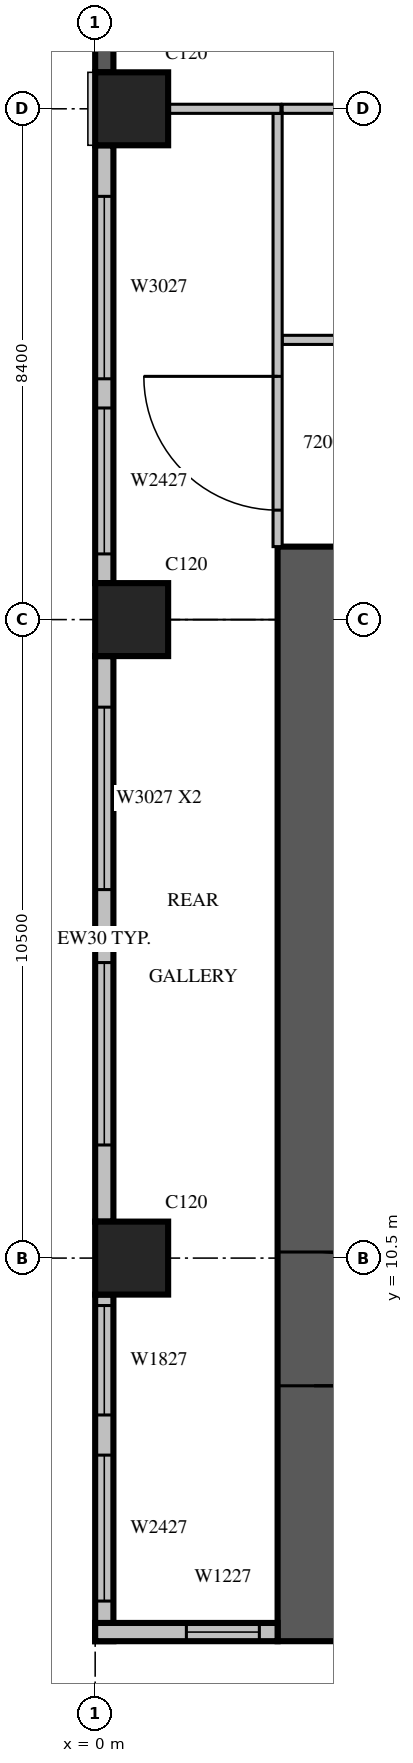
"""IFC4 building model, lengths in metres.
Left out: names, types, materials, properties, quantities, classifications, styles, units other than length and angle.
Written with IfcOpenShell. Run it as: python <this file> out.ifc"""

import sys

from ifc_helpers import new_model, si_unit, direction, frame, frame_2d, origin, origin_2d, place, context, subcontext, project, spatial, rectangle, extrude, source, transform, mapped, element, fill, save


model = new_model("IFC4")
c1 = context("Model", 3, precision=1e-05, world=origin(), true_north=direction((0.0, 1.0)))
c2 = subcontext(c1, "Body", "Model", "MODEL_VIEW")
j1 = project(units=[si_unit("LENGTHUNIT", "METRE"), si_unit("PLANEANGLEUNIT", "RADIAN")], contexts=[c1])
p1 = place(None, origin())
s1 = spatial("IfcSite", under=j1, at=p1, CompositionType="ELEMENT")
p2 = place(p1, origin())
s2 = spatial("IfcBuilding", under=s1, at=p2, CompositionType="ELEMENT")
p3 = place(p2, frame((0.0, 0.0, 95.1)))
s3 = spatial("IfcBuildingStorey", under=s2, at=p3, CompositionType="ELEMENT", Elevation=95.1)
m1 = source(origin(), c2, "Body", "SweptSolid", [
    extrude(rectangle(XDim=1.2, YDim=1.2, at=origin_2d()), origin(), (0.0, 0.0, 1.0), 4.2),
])
for number, where, z_axis, x_axis in (
    (1, (0.6, 10.5, 0.0), (0.0, 0.0, 1.0), (1.0, 0.0, 0.0)),
    (2, (0.6, 21.0, 0.0), (0.0, 0.0, 1.0), (1.0, 0.0, 0.0)),
    (3, (0.6, 29.4, 0.0), (0.0, 0.0, 1.0), (1.0, 0.0, 0.0)),
):
    element("IfcColumn", number, at=place(p3, frame(where, z_axis=z_axis, x_axis=x_axis)), inside=s3, PredefinedType="COLUMN", context=c2, shape_type="MappedRepresentation", body=[
        mapped(m1, transform((0.0, 0.0, 0.0), scale=1.0)),
    ])
m2 = source(origin(), c2, "Body", "SweptSolid", [
    extrude(rectangle(XDim=18.0, YDim=1.2, at=frame_2d((9.0, 0.0))), origin(), (0.0, 0.0, 1.0), 4.2),
])
p4 = place(p3, frame((3.6, 4.2, 0.0), z_axis=(0.0, 0.0, 1.0), x_axis=(0.0, 1.0, 0.0)))
e4 = element("IfcWall", 4, at=p4, inside=s3, PredefinedType="SHEAR", context=c2, shape_type="MappedRepresentation", body=[
    mapped(m2, transform((0.0, 0.0, 0.0), scale=1.0)),
])
m3 = source(origin(), c2, "Body", "SweptSolid", [
    extrude(rectangle(XDim=2.2, YDim=2.1, at=frame_2d((1.1, 1.05))), frame((0.0, 0.61, 0.0), z_axis=(0.0, -1.0, 0.0), x_axis=(1.0, 0.0, 0.0)), (0.0, 0.0, 1.0), 1.22),
])
p5 = place(p4, frame((4.2, 0.0, 0.0)))
e5 = element("IfcOpeningElement", 5, at=p5, cuts=e4, PredefinedType="OPENING", context=c2, shape_type="MappedRepresentation", body=[
    mapped(m3, transform((0.0, 0.0, 0.0), scale=1.0)),
])
m4 = source(origin(), c2, "Body", "SweptSolid", [
    extrude(rectangle(XDim=4.2, YDim=0.3, at=frame_2d((2.1, 0.0))), origin(), (0.0, 0.0, 1.0), 3.8),
])
p6 = place(p3, frame((0.15, 34.2, 0.0), z_axis=(0.0, 0.0, 1.0), x_axis=(0.0, -1.0, 0.0)))
e6 = element("IfcWall", 6, at=p6, inside=s3, PredefinedType="SOLIDWALL", context=c2, shape_type="MappedRepresentation", body=[
    mapped(m4, transform((0.0, 0.0, 0.0), scale=1.0)),
])
m5 = source(origin(), c2, "Body", "SweptSolid", [
    extrude(rectangle(XDim=1.8, YDim=2.7, at=frame_2d((0.9, 1.35))), frame((0.0, 0.16, 0.0), z_axis=(0.0, -1.0, 0.0), x_axis=(1.0, 0.0, 0.0)), (0.0, 0.0, 1.0), 0.32),
])
p7 = place(p6, frame((1.175, 0.0, 0.6)))
e7 = element("IfcOpeningElement", 7, at=p7, cuts=e6, PredefinedType="OPENING", context=c2, shape_type="MappedRepresentation", body=[
    mapped(m5, transform((0.0, 0.0, 0.0), scale=1.0)),
])
m6 = source(origin(), c2, "Body", "SweptSolid", [
    extrude(rectangle(XDim=7.2, YDim=0.3, at=frame_2d((3.6, 0.0))), origin(), (0.0, 0.0, 1.0), 3.8),
])
p8 = place(p3, frame((0.15, 28.8, 0.0), z_axis=(0.0, 0.0, 1.0), x_axis=(0.0, -1.0, 0.0)))
e8 = element("IfcWall", 8, at=p8, inside=s3, PredefinedType="STANDARD", context=c2, shape_type="MappedRepresentation", body=[
    mapped(m6, transform((0.0, 0.0, 0.0), scale=1.0)),
])
m7 = source(origin(), c2, "Body", "SweptSolid", [
    extrude(rectangle(XDim=3.0, YDim=2.7, at=frame_2d((1.5, 1.35))), frame((0.0, 0.16, 0.0), z_axis=(0.0, -1.0, 0.0), x_axis=(1.0, 0.0, 0.0)), (0.0, 0.0, 1.0), 0.32),
])
p9 = place(p8, frame((0.84, 0.0, 0.6)))
e9 = element("IfcOpeningElement", 9, at=p9, cuts=e8, PredefinedType="OPENING", context=c2, shape_type="MappedRepresentation", body=[
    mapped(m7, transform((0.0, 0.0, 0.0), scale=1.0)),
])
m8 = source(origin(), c2, "Body", "SweptSolid", [
    extrude(rectangle(XDim=2.4, YDim=2.7, at=frame_2d((1.2, 1.35))), frame((0.0, 0.16, 0.0), z_axis=(0.0, -1.0, 0.0), x_axis=(1.0, 0.0, 0.0)), (0.0, 0.0, 1.0), 0.32),
])
p10 = place(p8, frame((4.32, 0.0, 0.6)))
e10 = element("IfcOpeningElement", 10, at=p10, cuts=e8, PredefinedType="OPENING", context=c2, shape_type="MappedRepresentation", body=[
    mapped(m8, transform((0.0, 0.0, 0.0), scale=1.0)),
])
m9 = source(origin(), c2, "Body", "SweptSolid", [
    extrude(rectangle(XDim=9.3, YDim=0.3, at=frame_2d((4.65, 0.0))), origin(), (0.0, 0.0, 1.0), 3.8),
])
p11 = place(p3, frame((0.15, 20.4, 0.0), z_axis=(0.0, 0.0, 1.0), x_axis=(0.0, -1.0, 0.0)))
e11 = element("IfcWall", 11, at=p11, inside=s3, PredefinedType="STANDARD", context=c2, shape_type="MappedRepresentation", body=[
    mapped(m9, transform((0.0, 0.0, 0.0), scale=1.0)),
])
p12 = place(p11, frame((0.84, 0.0, 0.6)))
e12 = element("IfcOpeningElement", 12, at=p12, cuts=e11, PredefinedType="OPENING", context=c2, shape_type="MappedRepresentation", body=[
    mapped(m7, transform((0.0, 0.0, 0.0), scale=1.0)),
])
p13 = place(p11, frame((5.04, 0.0, 0.6)))
e13 = element("IfcOpeningElement", 13, at=p13, cuts=e11, PredefinedType="OPENING", context=c2, shape_type="MappedRepresentation", body=[
    mapped(m7, transform((0.0, 0.0, 0.0), scale=1.0)),
])
m10 = source(origin(), c2, "Body", "SweptSolid", [
    extrude(rectangle(XDim=5.7, YDim=0.3, at=frame_2d((2.85, 0.0))), origin(), (0.0, 0.0, 1.0), 3.8),
])
p14 = place(p3, frame((0.15, 9.9, 0.0), z_axis=(0.0, 0.0, 1.0), x_axis=(0.0, -1.0, 0.0)))
e14 = element("IfcWall", 14, at=p14, inside=s3, PredefinedType="STANDARD", context=c2, shape_type="MappedRepresentation", body=[
    mapped(m10, transform((0.0, 0.0, 0.0), scale=1.0)),
])
p15 = place(p14, frame((0.18, 0.0, 0.6)))
e15 = element("IfcOpeningElement", 15, at=p15, cuts=e14, PredefinedType="OPENING", context=c2, shape_type="MappedRepresentation", body=[
    mapped(m5, transform((0.0, 0.0, 0.0), scale=1.0)),
])
p16 = place(p14, frame((2.64, 0.0, 0.6)))
e16 = element("IfcOpeningElement", 16, at=p16, cuts=e14, PredefinedType="OPENING", context=c2, shape_type="MappedRepresentation", body=[
    mapped(m8, transform((0.0, 0.0, 0.0), scale=1.0)),
])
m11 = source(origin(), c2, "Body", "SweptSolid", [
    extrude(rectangle(XDim=3.0, YDim=0.3, at=frame_2d((1.5, 0.0))), origin(), (0.0, 0.0, 1.0), 3.8),
])
p17 = place(p3, frame((0.0, 4.35, 0.0), z_axis=(0.0, 0.0, 1.0), x_axis=(1.0, 0.0, 0.0)))
e17 = element("IfcWall", 17, at=p17, inside=s3, PredefinedType="STANDARD", context=c2, shape_type="MappedRepresentation", body=[
    mapped(m11, transform((0.0, 0.0, 0.0), scale=1.0)),
])
m12 = source(origin(), c2, "Body", "SweptSolid", [
    extrude(rectangle(XDim=1.2, YDim=2.7, at=frame_2d((0.6, 1.35))), frame((0.0, 0.16, 0.0), z_axis=(0.0, -1.0, 0.0), x_axis=(1.0, 0.0, 0.0)), (0.0, 0.0, 1.0), 0.32),
])
p18 = place(p17, frame((1.5, 0.0, 0.6)))
e18 = element("IfcOpeningElement", 18, at=p18, cuts=e17, PredefinedType="OPENING", context=c2, shape_type="MappedRepresentation", body=[
    mapped(m12, transform((0.0, 0.0, 0.0), scale=1.0)),
])
m13 = source(origin(), c2, "Body", "SweptSolid", [
    extrude(rectangle(XDim=11.925, YDim=0.15, at=frame_2d((5.963, 0.0))), origin(), (0.0, 0.0, 1.0), 3.8),
])
p19 = place(p3, frame((3.075, 25.6, 0.0), z_axis=(0.0, 0.0, 1.0), x_axis=(1.0, 0.0, 0.0)))
e19 = element("IfcWall", 19, at=p19, inside=s3, PredefinedType="PARTITIONING", context=c2, shape_type="MappedRepresentation", body=[
    mapped(m13, transform((0.0, 0.0, 0.0), scale=1.0)),
])
m14 = source(origin(), c2, "Body", "SweptSolid", [
    extrude(rectangle(XDim=0.9, YDim=2.1, at=frame_2d((0.45, 1.05))), frame((0.0, 0.085, 0.0), z_axis=(0.0, -1.0, 0.0), x_axis=(1.0, 0.0, 0.0)), (0.0, 0.0, 1.0), 0.17),
])
p20 = place(p19, frame((1.462, 0.0, 0.0)))
e20 = element("IfcOpeningElement", 20, at=p20, cuts=e19, PredefinedType="OPENING", context=c2, shape_type="MappedRepresentation", body=[
    mapped(m14, transform((0.0, 0.0, 0.0), scale=1.0)),
])
p21 = place(p19, frame((8.3, 0.0, 0.0)))
e21 = element("IfcOpeningElement", 21, at=p21, cuts=e19, PredefinedType="OPENING", context=c2, shape_type="MappedRepresentation", body=[
    mapped(m14, transform((0.0, 0.0, 0.0), scale=1.0)),
])
m15 = source(origin(), c2, "Body", "SweptSolid", [
    extrude(rectangle(XDim=6.826, YDim=0.15, at=frame_2d((3.413, 0.0))), origin(), (0.0, 0.0, 1.0), 3.8),
])
p22 = place(p3, frame((9.901, 29.4, 0.0), z_axis=(0.0, 0.0, 1.0), x_axis=(-1.0, 0.0, 0.0)))
e22 = element("IfcWall", 22, at=p22, inside=s3, PredefinedType="PARTITIONING", context=c2, shape_type="MappedRepresentation", body=[
    mapped(m15, transform((0.0, 0.0, 0.0), scale=1.0)),
])
m16 = source(origin(), c2, "Body", "SweptSolid", [
    extrude(rectangle(XDim=7.125, YDim=0.15, at=frame_2d((3.562, 0.0))), origin(), (0.0, 0.0, 1.0), 3.8),
])
p23 = place(p3, frame((3.0, 29.325, 0.0), z_axis=(0.0, 0.0, 1.0), x_axis=(0.0, -1.0, 0.0)))
e23 = element("IfcWall", 23, at=p23, inside=s3, PredefinedType="PARTITIONING", context=c2, shape_type="MappedRepresentation", body=[
    mapped(m16, transform((0.0, 0.0, 0.0), scale=1.0)),
])
m17 = source(origin(), c2, "Body", "SweptSolid", [
    extrude(rectangle(XDim=2.2, YDim=2.1, at=frame_2d((1.1, 1.05))), frame((0.0, 0.085, 0.0), z_axis=(0.0, -1.0, 0.0), x_axis=(1.0, 0.0, 0.0)), (0.0, 0.0, 1.0), 0.17),
])
p24 = place(p23, frame((4.325, 0.0, 0.0)))
e24 = element("IfcOpeningElement", 24, at=p24, cuts=e23, PredefinedType="OPENING", context=c2, shape_type="MappedRepresentation", body=[
    mapped(m17, transform((0.0, 0.0, 0.0), scale=1.0)),
])
m18 = source(origin(), c2, "Body", "SweptSolid", [
    extrude(rectangle(XDim=1.856, YDim=0.15, at=frame_2d((0.928, 0.0))), origin(), (0.0, 0.0, 1.0), 3.8),
])
p25 = place(p3, frame((3.055, 29.4, 0.0), z_axis=(0.0, 0.0, 1.0), x_axis=(-1.0, 0.0, 0.0)))
e25 = element("IfcWall", 25, at=p25, inside=s3, PredefinedType="PARTITIONING", context=c2, shape_type="MappedRepresentation", body=[
    mapped(m18, transform((0.0, 0.0, 0.0), scale=1.0)),
])
m19 = source(origin(), c2, "Body", "SweptSolid", [
    extrude(rectangle(XDim=3.0, YDim=2.7, at=frame_2d((1.5, 1.35))), frame((0.0, 0.03, 0.0), z_axis=(0.0, -1.0, 0.0), x_axis=(1.0, 0.0, 0.0)), (0.0, 0.0, 1.0), 0.06),
])
p26 = place(p9, origin())
e26 = element("IfcWindow", 26, at=p26, inside=s3, PartitioningType="SINGLE_PANEL", PredefinedType="WINDOW", context=c2, shape_type="MappedRepresentation", body=[
    mapped(m19, transform((0.0, 0.0, 0.0), scale=1.0)),
])
fill(e9, e26)
p27 = place(p12, origin())
e27 = element("IfcWindow", 27, at=p27, inside=s3, PartitioningType="SINGLE_PANEL", PredefinedType="WINDOW", context=c2, shape_type="MappedRepresentation", body=[
    mapped(m19, transform((0.0, 0.0, 0.0), scale=1.0)),
])
fill(e12, e27)
p28 = place(p13, origin())
e28 = element("IfcWindow", 28, at=p28, inside=s3, PartitioningType="SINGLE_PANEL", PredefinedType="WINDOW", context=c2, shape_type="MappedRepresentation", body=[
    mapped(m19, transform((0.0, 0.0, 0.0), scale=1.0)),
])
fill(e13, e28)
m20 = source(origin(), c2, "Body", "SweptSolid", [
    extrude(rectangle(XDim=1.8, YDim=2.7, at=frame_2d((0.9, 1.35))), frame((0.0, 0.03, 0.0), z_axis=(0.0, -1.0, 0.0), x_axis=(1.0, 0.0, 0.0)), (0.0, 0.0, 1.0), 0.06),
])
p29 = place(p15, origin())
e29 = element("IfcWindow", 29, at=p29, inside=s3, PartitioningType="SINGLE_PANEL", PredefinedType="WINDOW", context=c2, shape_type="MappedRepresentation", body=[
    mapped(m20, transform((0.0, 0.0, 0.0), scale=1.0)),
])
fill(e15, e29)
m21 = source(origin(), c2, "Body", "SweptSolid", [
    extrude(rectangle(XDim=2.4, YDim=2.7, at=frame_2d((1.2, 1.35))), frame((0.0, 0.03, 0.0), z_axis=(0.0, -1.0, 0.0), x_axis=(1.0, 0.0, 0.0)), (0.0, 0.0, 1.0), 0.06),
])
p30 = place(p10, origin())
e30 = element("IfcWindow", 30, at=p30, inside=s3, PartitioningType="SINGLE_PANEL", PredefinedType="WINDOW", context=c2, shape_type="MappedRepresentation", body=[
    mapped(m21, transform((0.0, 0.0, 0.0), scale=1.0)),
])
fill(e10, e30)
p31 = place(p16, origin())
e31 = element("IfcWindow", 31, at=p31, inside=s3, PartitioningType="SINGLE_PANEL", PredefinedType="WINDOW", context=c2, shape_type="MappedRepresentation", body=[
    mapped(m21, transform((0.0, 0.0, 0.0), scale=1.0)),
])
fill(e16, e31)
m22 = source(origin(), c2, "Body", "SweptSolid", [
    extrude(rectangle(XDim=1.2, YDim=2.7, at=frame_2d((0.6, 1.35))), frame((0.0, 0.03, 0.0), z_axis=(0.0, -1.0, 0.0), x_axis=(1.0, 0.0, 0.0)), (0.0, 0.0, 1.0), 0.06),
])
p32 = place(p18, origin())
e32 = element("IfcWindow", 32, at=p32, inside=s3, PartitioningType="SINGLE_PANEL", PredefinedType="WINDOW", context=c2, shape_type="MappedRepresentation", body=[
    mapped(m22, transform((0.0, 0.0, 0.0), scale=1.0)),
])
fill(e18, e32)
m23 = source(origin(), c2, "Body", "SweptSolid", [
    extrude(rectangle(XDim=2.2, YDim=2.1, at=frame_2d((1.1, 1.05))), frame((0.0, 0.025, 0.0), z_axis=(0.0, -1.0, 0.0), x_axis=(1.0, 0.0, 0.0)), (0.0, 0.0, 1.0), 0.05),
])
p33 = place(p5, origin())
e33 = element("IfcDoor", 33, at=p33, inside=s3, OperationType="DOUBLE_DOOR_SINGLE_SWING", PredefinedType="DOOR", context=c2, shape_type="MappedRepresentation", body=[
    mapped(m23, transform((0.0, 0.0, 0.0), scale=1.0)),
])
fill(e5, e33)
p34 = place(p24, origin())
e34 = element("IfcDoor", 34, at=p34, inside=s3, OperationType="DOUBLE_DOOR_SINGLE_SWING", PredefinedType="DOOR", context=c2, shape_type="MappedRepresentation", body=[
    mapped(m23, transform((0.0, 0.0, 0.0), scale=1.0)),
])
fill(e24, e34)
save(model, sys.argv[1])
